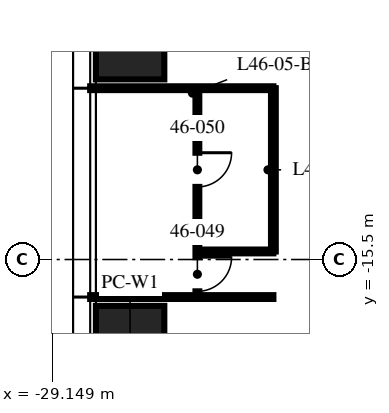
"""IFC4 building model, lengths in metres.
Left out: names, types, materials, properties, quantities, classifications, styles, units other than length and angle.
Written with IfcOpenShell. Run it as: python <this file> out.ifc"""

import sys

from ifc_helpers import new_model, si_unit, direction, frame, frame_2d, origin, origin_2d, place, context, subcontext, project, spatial, rectangle, hollow_rectangle, extrude, element, fill, save


model = new_model("IFC4")
c1 = context("Model", 3, precision=1e-05, world=origin(), true_north=direction((0.0, 1.0)))
c2 = subcontext(c1, "Body", "Model", "MODEL_VIEW")
j1 = project(units=[si_unit("LENGTHUNIT", "METRE"), si_unit("PLANEANGLEUNIT", "RADIAN")], contexts=[c1])
p1 = place(None, origin())
s1 = spatial("IfcSite", under=j1, at=p1, CompositionType="ELEMENT")
p2 = place(p1, origin())
s2 = spatial("IfcBuilding", under=s1, at=p2, CompositionType="ELEMENT")
p3 = place(p2, frame((0.0, 0.0, 182.25)))
s3 = spatial("IfcBuildingStorey", under=s2, at=p3, CompositionType="ELEMENT", Elevation=182.25)
for number, where, z_axis, x_axis in (
    (1, (-27.1, -18.32, 0.0), (0.0, 0.0, 1.0), (0.0, 1.0, 0.0)),
    (2, (-27.1, -9.16, 0.0), (0.0, 0.0, 1.0), (0.0, 1.0, 0.0)),
):
    element("IfcColumn", number, at=place(p3, frame(where, z_axis=z_axis, x_axis=x_axis)), inside=s3, PredefinedType="COLUMN", context=c2, shape_type="SweptSolid", body=[
        extrude(hollow_rectangle(XDim=3.2, YDim=1.8, WallThickness=0.2, at=origin_2d()), origin(), (0.0, 0.0, 1.0), 3.75),
    ])
for number, where, z_axis, x_axis in (
    (3, (-23.33, -10.992, 0.0), (0.0, 0.0, 1.0), (-1.0, 0.0, 0.0)),
    (4, (-23.33, -16.488, 0.0), (0.0, 0.0, 1.0), (-1.0, 0.0, 0.0)),
):
    element("IfcWall", number, at=place(p3, frame(where, z_axis=z_axis, x_axis=x_axis)), inside=s3, PredefinedType="PARTITIONING", context=c2, shape_type="SweptSolid", body=[
        extrude(rectangle(XDim=4.82, YDim=0.1, at=frame_2d((2.41, 0.0))), origin(), (0.0, 0.0, 1.0), 2.56),
    ])
p4 = place(p3, frame((-25.33, -10.992, 0.0), z_axis=(0.0, 0.0, 1.0), x_axis=(0.0, -1.0, 0.0)))
e5 = element("IfcWall", 5, at=p4, inside=s3, PredefinedType="PARTITIONING", context=c2, shape_type="SweptSolid", body=[
    extrude(rectangle(XDim=5.496, YDim=0.1, at=frame_2d((2.748, 0.0))), origin(), (0.0, 0.0, 1.0), 2.56),
])
p5 = place(p4, frame((4.446, 0.0, 0.0)))
e6 = element("IfcOpeningElement", 6, at=p5, cuts=e5, PredefinedType="OPENING", context=c2, shape_type="SweptSolid", body=[
    extrude(rectangle(XDim=0.9, YDim=2.1, at=frame_2d((0.45, 1.05))), frame((0.0, 0.06, 0.0), z_axis=(0.0, -1.0, 0.0), x_axis=(1.0, 0.0, 0.0)), (0.0, 0.0, 1.0), 0.12),
])
p6 = place(p4, frame((1.698, 0.0, 0.0)))
e7 = element("IfcOpeningElement", 7, at=p6, cuts=e5, PredefinedType="OPENING", context=c2, shape_type="SweptSolid", body=[
    extrude(rectangle(XDim=0.9, YDim=2.1, at=frame_2d((0.45, 1.05))), frame((0.0, 0.06, 0.0), z_axis=(0.0, -1.0, 0.0), x_axis=(1.0, 0.0, 0.0)), (0.0, 0.0, 1.0), 0.12),
])
p7 = place(p3, frame((-23.33, -15.288, 0.0), z_axis=(0.0, 0.0, 1.0), x_axis=(-1.0, 0.0, 0.0)))
e8 = element("IfcWall", 8, at=p7, inside=s3, PredefinedType="PARTITIONING", context=c2, shape_type="SweptSolid", body=[
    extrude(rectangle(XDim=2.0, YDim=0.1, at=frame_2d((1.0, 0.0))), origin(), (0.0, 0.0, 1.0), 3.45),
])
p8 = place(p3, frame((-23.33, -10.992, 0.0), z_axis=(0.0, 0.0, 1.0), x_axis=(0.0, -1.0, 0.0)))
e9 = element("IfcWall", 9, at=p8, inside=s3, PredefinedType="PARTITIONING", context=c2, shape_type="SweptSolid", body=[
    extrude(rectangle(XDim=4.296, YDim=0.125, at=frame_2d((2.148, 0.0))), origin(), (0.0, 0.0, 1.0), 2.56),
])
p9 = place(p5, origin())
e10 = element("IfcDoor", 10, at=p9, inside=s3, OperationType="SINGLE_SWING_LEFT", PredefinedType="DOOR", context=c2, shape_type="SweptSolid", body=[
    extrude(rectangle(XDim=0.9, YDim=2.1, at=frame_2d((0.45, 1.05))), frame((0.0, 0.025, 0.0), z_axis=(0.0, -1.0, 0.0), x_axis=(1.0, 0.0, 0.0)), (0.0, 0.0, 1.0), 0.05),
])
fill(e6, e10)
p10 = place(p6, origin())
e11 = element("IfcDoor", 11, at=p10, inside=s3, OperationType="SINGLE_SWING_LEFT", PredefinedType="DOOR", context=c2, shape_type="SweptSolid", body=[
    extrude(rectangle(XDim=0.9, YDim=2.1, at=frame_2d((0.45, 1.05))), frame((0.0, 0.025, 0.0), z_axis=(0.0, -1.0, 0.0), x_axis=(1.0, 0.0, 0.0)), (0.0, 0.0, 1.0), 0.05),
])
fill(e7, e11)
save(model, sys.argv[1])
